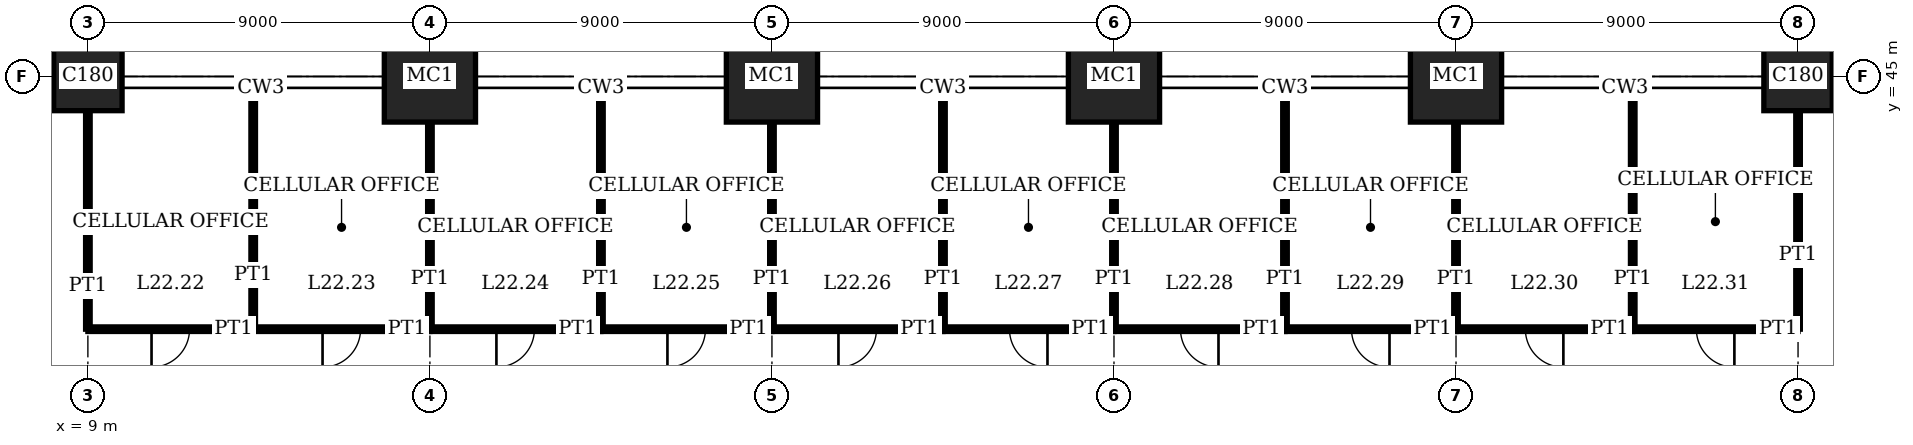
"""IFC4 building model, lengths in metres.
Left out: names, types, materials, properties, quantities, classifications, styles, units other than length and angle.
Written with IfcOpenShell. Run it as: python <this file> out.ifc"""

import sys

from ifc_helpers import new_model, si_unit, direction, frame, frame_2d, origin, origin_2d, place, context, subcontext, project, spatial, rectangle, extrude, element, fill, save


model = new_model("IFC4")
c1 = context("Model", 3, precision=1e-05, world=origin(), true_north=direction((0.0, 1.0)))
c2 = subcontext(c1, "Body", "Model", "MODEL_VIEW")
j1 = project(units=[si_unit("LENGTHUNIT", "METRE"), si_unit("PLANEANGLEUNIT", "RADIAN")], contexts=[c1])
p1 = place(None, origin())
s1 = spatial("IfcSite", under=j1, at=p1, CompositionType="ELEMENT")
p2 = place(p1, origin())
s2 = spatial("IfcBuilding", under=s1, at=p2, CompositionType="ELEMENT")
p3 = place(p2, frame((0.0, 0.0, 93.0)))
s3 = spatial("IfcBuildingStorey", under=s2, at=p3, CompositionType="ELEMENT", Elevation=93.0)
p4 = place(p3, frame((9.0, 45.0, 0.0), z_axis=(0.0, 0.0, 1.0), x_axis=(1.0, 0.0, 0.0)))
e1 = element("IfcColumn", 1, at=p4, inside=s3, PredefinedType="COLUMN", context=c2, shape_type="SweptSolid", body=[
    extrude(rectangle(XDim=1.8, YDim=1.8, at=origin_2d()), origin(), (0.0, 0.0, 1.0), 4.0),
])
for number, where, z_axis, x_axis in (
    (2, (18.0, 45.0, 0.0), (0.0, 0.0, 1.0), (1.0, 0.0, 0.0)),
    (3, (27.0, 45.0, 0.0), (0.0, 0.0, 1.0), (1.0, 0.0, 0.0)),
    (4, (36.0, 45.0, 0.0), (0.0, 0.0, 1.0), (1.0, 0.0, 0.0)),
    (5, (45.0, 45.0, 0.0), (0.0, 0.0, 1.0), (1.0, 0.0, 0.0)),
):
    element("IfcColumn", number, at=place(p3, frame(where, z_axis=z_axis, x_axis=x_axis)), inside=s3, PredefinedType="COLUMN", context=c2, shape_type="SweptSolid", body=[
        extrude(rectangle(XDim=2.4, YDim=2.4, at=origin_2d()), origin(), (0.0, 0.0, 1.0), 4.0),
    ])
p5 = place(p3, frame((54.0, 45.0, 0.0), z_axis=(0.0, 0.0, 1.0), x_axis=(1.0, 0.0, 0.0)))
e6 = element("IfcColumn", 6, at=p5, inside=s3, PredefinedType="COLUMN", context=c2, shape_type="SweptSolid", body=[
    extrude(rectangle(XDim=1.8, YDim=1.8, at=origin_2d()), origin(), (0.0, 0.0, 1.0), 4.0),
])
p6 = place(p3, frame((9.0, 38.35, 0.0), z_axis=(0.0, 0.0, 1.0), x_axis=(1.0, 0.0, 0.0)))
e7 = element("IfcWall", 7, at=p6, inside=s3, PredefinedType="PARTITIONING", context=c2, shape_type="SweptSolid", body=[
    extrude(rectangle(XDim=4.35, YDim=0.12, at=frame_2d((2.175, 0.0))), origin(), (0.0, 0.0, 1.0), 3.75),
])
p7 = place(p6, frame((1.675, 0.0, 0.0)))
e8 = element("IfcOpeningElement", 8, at=p7, cuts=e7, PredefinedType="OPENING", context=c2, shape_type="SweptSolid", body=[
    extrude(rectangle(XDim=1.0, YDim=2.4, at=frame_2d((0.5, 1.2))), frame((0.0, 0.07, 0.0), z_axis=(0.0, -1.0, 0.0), x_axis=(1.0, 0.0, 0.0)), (0.0, 0.0, 1.0), 0.14),
])
p8 = place(p3, frame((13.35, 38.35, 0.0), z_axis=(0.0, 0.0, 1.0), x_axis=(1.0, 0.0, 0.0)))
e9 = element("IfcWall", 9, at=p8, inside=s3, PredefinedType="PARTITIONING", context=c2, shape_type="SweptSolid", body=[
    extrude(rectangle(XDim=4.65, YDim=0.12, at=frame_2d((2.325, 0.0))), origin(), (0.0, 0.0, 1.0), 3.75),
])
p9 = place(p8, frame((1.825, 0.0, 0.0)))
e10 = element("IfcOpeningElement", 10, at=p9, cuts=e9, PredefinedType="OPENING", context=c2, shape_type="SweptSolid", body=[
    extrude(rectangle(XDim=1.0, YDim=2.4, at=frame_2d((0.5, 1.2))), frame((0.0, 0.07, 0.0), z_axis=(0.0, -1.0, 0.0), x_axis=(1.0, 0.0, 0.0)), (0.0, 0.0, 1.0), 0.14),
])
p10 = place(p3, frame((18.0, 38.35, 0.0), z_axis=(0.0, 0.0, 1.0), x_axis=(1.0, 0.0, 0.0)))
e11 = element("IfcWall", 11, at=p10, inside=s3, PredefinedType="PARTITIONING", context=c2, shape_type="SweptSolid", body=[
    extrude(rectangle(XDim=4.5, YDim=0.12, at=frame_2d((2.25, 0.0))), origin(), (0.0, 0.0, 1.0), 3.75),
])
p11 = place(p10, frame((1.75, 0.0, 0.0)))
e12 = element("IfcOpeningElement", 12, at=p11, cuts=e11, PredefinedType="OPENING", context=c2, shape_type="SweptSolid", body=[
    extrude(rectangle(XDim=1.0, YDim=2.4, at=frame_2d((0.5, 1.2))), frame((0.0, 0.07, 0.0), z_axis=(0.0, -1.0, 0.0), x_axis=(1.0, 0.0, 0.0)), (0.0, 0.0, 1.0), 0.14),
])
p12 = place(p3, frame((22.5, 38.35, 0.0), z_axis=(0.0, 0.0, 1.0), x_axis=(1.0, 0.0, 0.0)))
e13 = element("IfcWall", 13, at=p12, inside=s3, PredefinedType="PARTITIONING", context=c2, shape_type="SweptSolid", body=[
    extrude(rectangle(XDim=4.5, YDim=0.12, at=frame_2d((2.25, 0.0))), origin(), (0.0, 0.0, 1.0), 3.75),
])
p13 = place(p12, frame((1.75, 0.0, 0.0)))
e14 = element("IfcOpeningElement", 14, at=p13, cuts=e13, PredefinedType="OPENING", context=c2, shape_type="SweptSolid", body=[
    extrude(rectangle(XDim=1.0, YDim=2.4, at=frame_2d((0.5, 1.2))), frame((0.0, 0.07, 0.0), z_axis=(0.0, -1.0, 0.0), x_axis=(1.0, 0.0, 0.0)), (0.0, 0.0, 1.0), 0.14),
])
p14 = place(p3, frame((27.0, 38.35, 0.0), z_axis=(0.0, 0.0, 1.0), x_axis=(1.0, 0.0, 0.0)))
e15 = element("IfcWall", 15, at=p14, inside=s3, PredefinedType="PARTITIONING", context=c2, shape_type="SweptSolid", body=[
    extrude(rectangle(XDim=4.5, YDim=0.12, at=frame_2d((2.25, 0.0))), origin(), (0.0, 0.0, 1.0), 3.75),
])
p15 = place(p14, frame((1.75, 0.0, 0.0)))
e16 = element("IfcOpeningElement", 16, at=p15, cuts=e15, PredefinedType="OPENING", context=c2, shape_type="SweptSolid", body=[
    extrude(rectangle(XDim=1.0, YDim=2.4, at=frame_2d((0.5, 1.2))), frame((0.0, 0.07, 0.0), z_axis=(0.0, -1.0, 0.0), x_axis=(1.0, 0.0, 0.0)), (0.0, 0.0, 1.0), 0.14),
])
p16 = place(p3, frame((31.5, 38.35, 0.0), z_axis=(0.0, 0.0, 1.0), x_axis=(1.0, 0.0, 0.0)))
e17 = element("IfcWall", 17, at=p16, inside=s3, PredefinedType="PARTITIONING", context=c2, shape_type="SweptSolid", body=[
    extrude(rectangle(XDim=4.5, YDim=0.12, at=frame_2d((2.25, 0.0))), origin(), (0.0, 0.0, 1.0), 3.75),
])
p17 = place(p16, frame((1.75, 0.0, 0.0)))
e18 = element("IfcOpeningElement", 18, at=p17, cuts=e17, PredefinedType="OPENING", context=c2, shape_type="SweptSolid", body=[
    extrude(rectangle(XDim=1.0, YDim=2.4, at=frame_2d((0.5, 1.2))), frame((0.0, 0.07, 0.0), z_axis=(0.0, -1.0, 0.0), x_axis=(1.0, 0.0, 0.0)), (0.0, 0.0, 1.0), 0.14),
])
p18 = place(p3, frame((36.0, 38.35, 0.0), z_axis=(0.0, 0.0, 1.0), x_axis=(1.0, 0.0, 0.0)))
e19 = element("IfcWall", 19, at=p18, inside=s3, PredefinedType="PARTITIONING", context=c2, shape_type="SweptSolid", body=[
    extrude(rectangle(XDim=4.5, YDim=0.12, at=frame_2d((2.25, 0.0))), origin(), (0.0, 0.0, 1.0), 3.75),
])
p19 = place(p18, frame((1.75, 0.0, 0.0)))
e20 = element("IfcOpeningElement", 20, at=p19, cuts=e19, PredefinedType="OPENING", context=c2, shape_type="SweptSolid", body=[
    extrude(rectangle(XDim=1.0, YDim=2.4, at=frame_2d((0.5, 1.2))), frame((0.0, 0.07, 0.0), z_axis=(0.0, -1.0, 0.0), x_axis=(1.0, 0.0, 0.0)), (0.0, 0.0, 1.0), 0.14),
])
p20 = place(p3, frame((40.5, 38.35, 0.0), z_axis=(0.0, 0.0, 1.0), x_axis=(1.0, 0.0, 0.0)))
e21 = element("IfcWall", 21, at=p20, inside=s3, PredefinedType="PARTITIONING", context=c2, shape_type="SweptSolid", body=[
    extrude(rectangle(XDim=4.5, YDim=0.12, at=frame_2d((2.25, 0.0))), origin(), (0.0, 0.0, 1.0), 3.75),
])
p21 = place(p20, frame((1.75, 0.0, 0.0)))
e22 = element("IfcOpeningElement", 22, at=p21, cuts=e21, PredefinedType="OPENING", context=c2, shape_type="SweptSolid", body=[
    extrude(rectangle(XDim=1.0, YDim=2.4, at=frame_2d((0.5, 1.2))), frame((0.0, 0.07, 0.0), z_axis=(0.0, -1.0, 0.0), x_axis=(1.0, 0.0, 0.0)), (0.0, 0.0, 1.0), 0.14),
])
p22 = place(p3, frame((45.0, 38.35, 0.0), z_axis=(0.0, 0.0, 1.0), x_axis=(1.0, 0.0, 0.0)))
e23 = element("IfcWall", 23, at=p22, inside=s3, PredefinedType="PARTITIONING", context=c2, shape_type="SweptSolid", body=[
    extrude(rectangle(XDim=4.65, YDim=0.12, at=frame_2d((2.325, 0.0))), origin(), (0.0, 0.0, 1.0), 3.75),
])
p23 = place(p22, frame((1.825, 0.0, 0.0)))
e24 = element("IfcOpeningElement", 24, at=p23, cuts=e23, PredefinedType="OPENING", context=c2, shape_type="SweptSolid", body=[
    extrude(rectangle(XDim=1.0, YDim=2.4, at=frame_2d((0.5, 1.2))), frame((0.0, 0.07, 0.0), z_axis=(0.0, -1.0, 0.0), x_axis=(1.0, 0.0, 0.0)), (0.0, 0.0, 1.0), 0.14),
])
p24 = place(p3, frame((49.65, 38.35, 0.0), z_axis=(0.0, 0.0, 1.0), x_axis=(1.0, 0.0, 0.0)))
e25 = element("IfcWall", 25, at=p24, inside=s3, PredefinedType="PARTITIONING", context=c2, shape_type="SweptSolid", body=[
    extrude(rectangle(XDim=4.35, YDim=0.12, at=frame_2d((2.175, 0.0))), origin(), (0.0, 0.0, 1.0), 3.75),
])
p25 = place(p24, frame((1.675, 0.0, 0.0)))
e26 = element("IfcOpeningElement", 26, at=p25, cuts=e25, PredefinedType="OPENING", context=c2, shape_type="SweptSolid", body=[
    extrude(rectangle(XDim=1.0, YDim=2.4, at=frame_2d((0.5, 1.2))), frame((0.0, 0.07, 0.0), z_axis=(0.0, -1.0, 0.0), x_axis=(1.0, 0.0, 0.0)), (0.0, 0.0, 1.0), 0.14),
])
p26 = place(p3, frame((9.0, 38.35, 0.0), z_axis=(0.0, 0.0, 1.0), x_axis=(0.0, 1.0, 0.0)))
e27 = element("IfcWall", 27, at=p26, inside=s3, PredefinedType="PARTITIONING", context=c2, shape_type="SweptSolid", body=[
    extrude(rectangle(XDim=5.75, YDim=0.12, at=frame_2d((2.875, 0.0))), origin(), (0.0, 0.0, 1.0), 3.05),
])
p27 = place(p3, frame((13.35, 38.35, 0.0), z_axis=(0.0, 0.0, 1.0), x_axis=(0.0, 1.0, 0.0)))
e28 = element("IfcWall", 28, at=p27, inside=s3, PredefinedType="PARTITIONING", context=c2, shape_type="SweptSolid", body=[
    extrude(rectangle(XDim=6.34, YDim=0.12, at=frame_2d((3.17, 0.0))), origin(), (0.0, 0.0, 1.0), 3.75),
])
p28 = place(p3, frame((18.0, 38.35, 0.0), z_axis=(0.0, 0.0, 1.0), x_axis=(0.0, 1.0, 0.0)))
e29 = element("IfcWall", 29, at=p28, inside=s3, PredefinedType="PARTITIONING", context=c2, shape_type="SweptSolid", body=[
    extrude(rectangle(XDim=5.45, YDim=0.12, at=frame_2d((2.725, 0.0))), origin(), (0.0, 0.0, 1.0), 3.05),
])
p29 = place(p3, frame((22.5, 38.35, 0.0), z_axis=(0.0, 0.0, 1.0), x_axis=(0.0, 1.0, 0.0)))
e30 = element("IfcWall", 30, at=p29, inside=s3, PredefinedType="PARTITIONING", context=c2, shape_type="SweptSolid", body=[
    extrude(rectangle(XDim=6.34, YDim=0.12, at=frame_2d((3.17, 0.0))), origin(), (0.0, 0.0, 1.0), 3.75),
])
p30 = place(p3, frame((27.0, 38.35, 0.0), z_axis=(0.0, 0.0, 1.0), x_axis=(0.0, 1.0, 0.0)))
e31 = element("IfcWall", 31, at=p30, inside=s3, PredefinedType="PARTITIONING", context=c2, shape_type="SweptSolid", body=[
    extrude(rectangle(XDim=5.45, YDim=0.12, at=frame_2d((2.725, 0.0))), origin(), (0.0, 0.0, 1.0), 3.05),
])
p31 = place(p3, frame((31.5, 38.35, 0.0), z_axis=(0.0, 0.0, 1.0), x_axis=(0.0, 1.0, 0.0)))
e32 = element("IfcWall", 32, at=p31, inside=s3, PredefinedType="PARTITIONING", context=c2, shape_type="SweptSolid", body=[
    extrude(rectangle(XDim=6.34, YDim=0.12, at=frame_2d((3.17, 0.0))), origin(), (0.0, 0.0, 1.0), 3.75),
])
p32 = place(p3, frame((36.0, 38.35, 0.0), z_axis=(0.0, 0.0, 1.0), x_axis=(0.0, 1.0, 0.0)))
e33 = element("IfcWall", 33, at=p32, inside=s3, PredefinedType="PARTITIONING", context=c2, shape_type="SweptSolid", body=[
    extrude(rectangle(XDim=5.45, YDim=0.12, at=frame_2d((2.725, 0.0))), origin(), (0.0, 0.0, 1.0), 3.05),
])
p33 = place(p3, frame((40.5, 38.35, 0.0), z_axis=(0.0, 0.0, 1.0), x_axis=(0.0, 1.0, 0.0)))
e34 = element("IfcWall", 34, at=p33, inside=s3, PredefinedType="PARTITIONING", context=c2, shape_type="SweptSolid", body=[
    extrude(rectangle(XDim=6.34, YDim=0.12, at=frame_2d((3.17, 0.0))), origin(), (0.0, 0.0, 1.0), 3.75),
])
p34 = place(p3, frame((45.0, 38.35, 0.0), z_axis=(0.0, 0.0, 1.0), x_axis=(0.0, 1.0, 0.0)))
e35 = element("IfcWall", 35, at=p34, inside=s3, PredefinedType="PARTITIONING", context=c2, shape_type="SweptSolid", body=[
    extrude(rectangle(XDim=5.45, YDim=0.12, at=frame_2d((2.725, 0.0))), origin(), (0.0, 0.0, 1.0), 3.05),
])
p35 = place(p3, frame((49.65, 38.35, 0.0), z_axis=(0.0, 0.0, 1.0), x_axis=(0.0, 1.0, 0.0)))
e36 = element("IfcWall", 36, at=p35, inside=s3, PredefinedType="PARTITIONING", context=c2, shape_type="SweptSolid", body=[
    extrude(rectangle(XDim=6.34, YDim=0.12, at=frame_2d((3.17, 0.0))), origin(), (0.0, 0.0, 1.0), 3.75),
])
p36 = place(p3, frame((54.0, 38.35, 0.0), z_axis=(0.0, 0.0, 1.0), x_axis=(0.0, 1.0, 0.0)))
e37 = element("IfcWall", 37, at=p36, inside=s3, PredefinedType="PARTITIONING", context=c2, shape_type="SweptSolid", body=[
    extrude(rectangle(XDim=5.75, YDim=0.12, at=frame_2d((2.875, 0.0))), origin(), (0.0, 0.0, 1.0), 3.05),
])
p37 = place(p7, origin())
e38 = element("IfcDoor", 38, at=p37, inside=s3, OperationType="SINGLE_SWING_LEFT", PredefinedType="DOOR", context=c2, shape_type="SweptSolid", body=[
    extrude(rectangle(XDim=1.0, YDim=2.4, at=frame_2d((0.5, 1.2))), frame((0.0, 0.025, 0.0), z_axis=(0.0, -1.0, 0.0), x_axis=(1.0, 0.0, 0.0)), (0.0, 0.0, 1.0), 0.05),
])
fill(e8, e38)
p38 = place(p9, origin())
e39 = element("IfcDoor", 39, at=p38, inside=s3, OperationType="SINGLE_SWING_LEFT", PredefinedType="DOOR", context=c2, shape_type="SweptSolid", body=[
    extrude(rectangle(XDim=1.0, YDim=2.4, at=frame_2d((0.5, 1.2))), frame((0.0, 0.025, 0.0), z_axis=(0.0, -1.0, 0.0), x_axis=(1.0, 0.0, 0.0)), (0.0, 0.0, 1.0), 0.05),
])
fill(e10, e39)
p39 = place(p11, origin())
e40 = element("IfcDoor", 40, at=p39, inside=s3, OperationType="SINGLE_SWING_LEFT", PredefinedType="DOOR", context=c2, shape_type="SweptSolid", body=[
    extrude(rectangle(XDim=1.0, YDim=2.4, at=frame_2d((0.5, 1.2))), frame((0.0, 0.025, 0.0), z_axis=(0.0, -1.0, 0.0), x_axis=(1.0, 0.0, 0.0)), (0.0, 0.0, 1.0), 0.05),
])
fill(e12, e40)
p40 = place(p13, origin())
e41 = element("IfcDoor", 41, at=p40, inside=s3, OperationType="SINGLE_SWING_LEFT", PredefinedType="DOOR", context=c2, shape_type="SweptSolid", body=[
    extrude(rectangle(XDim=1.0, YDim=2.4, at=frame_2d((0.5, 1.2))), frame((0.0, 0.025, 0.0), z_axis=(0.0, -1.0, 0.0), x_axis=(1.0, 0.0, 0.0)), (0.0, 0.0, 1.0), 0.05),
])
fill(e14, e41)
p41 = place(p15, origin())
e42 = element("IfcDoor", 42, at=p41, inside=s3, OperationType="SINGLE_SWING_LEFT", PredefinedType="DOOR", context=c2, shape_type="SweptSolid", body=[
    extrude(rectangle(XDim=1.0, YDim=2.4, at=frame_2d((0.5, 1.2))), frame((0.0, 0.025, 0.0), z_axis=(0.0, -1.0, 0.0), x_axis=(1.0, 0.0, 0.0)), (0.0, 0.0, 1.0), 0.05),
])
fill(e16, e42)
p42 = place(p17, origin())
e43 = element("IfcDoor", 43, at=p42, inside=s3, OperationType="SINGLE_SWING_RIGHT", PredefinedType="DOOR", context=c2, shape_type="SweptSolid", body=[
    extrude(rectangle(XDim=1.0, YDim=2.4, at=frame_2d((0.5, 1.2))), frame((0.0, 0.025, 0.0), z_axis=(0.0, -1.0, 0.0), x_axis=(1.0, 0.0, 0.0)), (0.0, 0.0, 1.0), 0.05),
])
fill(e18, e43)
p43 = place(p19, origin())
e44 = element("IfcDoor", 44, at=p43, inside=s3, OperationType="SINGLE_SWING_RIGHT", PredefinedType="DOOR", context=c2, shape_type="SweptSolid", body=[
    extrude(rectangle(XDim=1.0, YDim=2.4, at=frame_2d((0.5, 1.2))), frame((0.0, 0.025, 0.0), z_axis=(0.0, -1.0, 0.0), x_axis=(1.0, 0.0, 0.0)), (0.0, 0.0, 1.0), 0.05),
])
fill(e20, e44)
p44 = place(p21, origin())
e45 = element("IfcDoor", 45, at=p44, inside=s3, OperationType="SINGLE_SWING_RIGHT", PredefinedType="DOOR", context=c2, shape_type="SweptSolid", body=[
    extrude(rectangle(XDim=1.0, YDim=2.4, at=frame_2d((0.5, 1.2))), frame((0.0, 0.025, 0.0), z_axis=(0.0, -1.0, 0.0), x_axis=(1.0, 0.0, 0.0)), (0.0, 0.0, 1.0), 0.05),
])
fill(e22, e45)
p45 = place(p23, origin())
e46 = element("IfcDoor", 46, at=p45, inside=s3, OperationType="SINGLE_SWING_RIGHT", PredefinedType="DOOR", context=c2, shape_type="SweptSolid", body=[
    extrude(rectangle(XDim=1.0, YDim=2.4, at=frame_2d((0.5, 1.2))), frame((0.0, 0.025, 0.0), z_axis=(0.0, -1.0, 0.0), x_axis=(1.0, 0.0, 0.0)), (0.0, 0.0, 1.0), 0.05),
])
fill(e24, e46)
p46 = place(p25, origin())
e47 = element("IfcDoor", 47, at=p46, inside=s3, OperationType="SINGLE_SWING_RIGHT", PredefinedType="DOOR", context=c2, shape_type="SweptSolid", body=[
    extrude(rectangle(XDim=1.0, YDim=2.4, at=frame_2d((0.5, 1.2))), frame((0.0, 0.025, 0.0), z_axis=(0.0, -1.0, 0.0), x_axis=(1.0, 0.0, 0.0)), (0.0, 0.0, 1.0), 0.05),
])
fill(e26, e47)
save(model, sys.argv[1])
